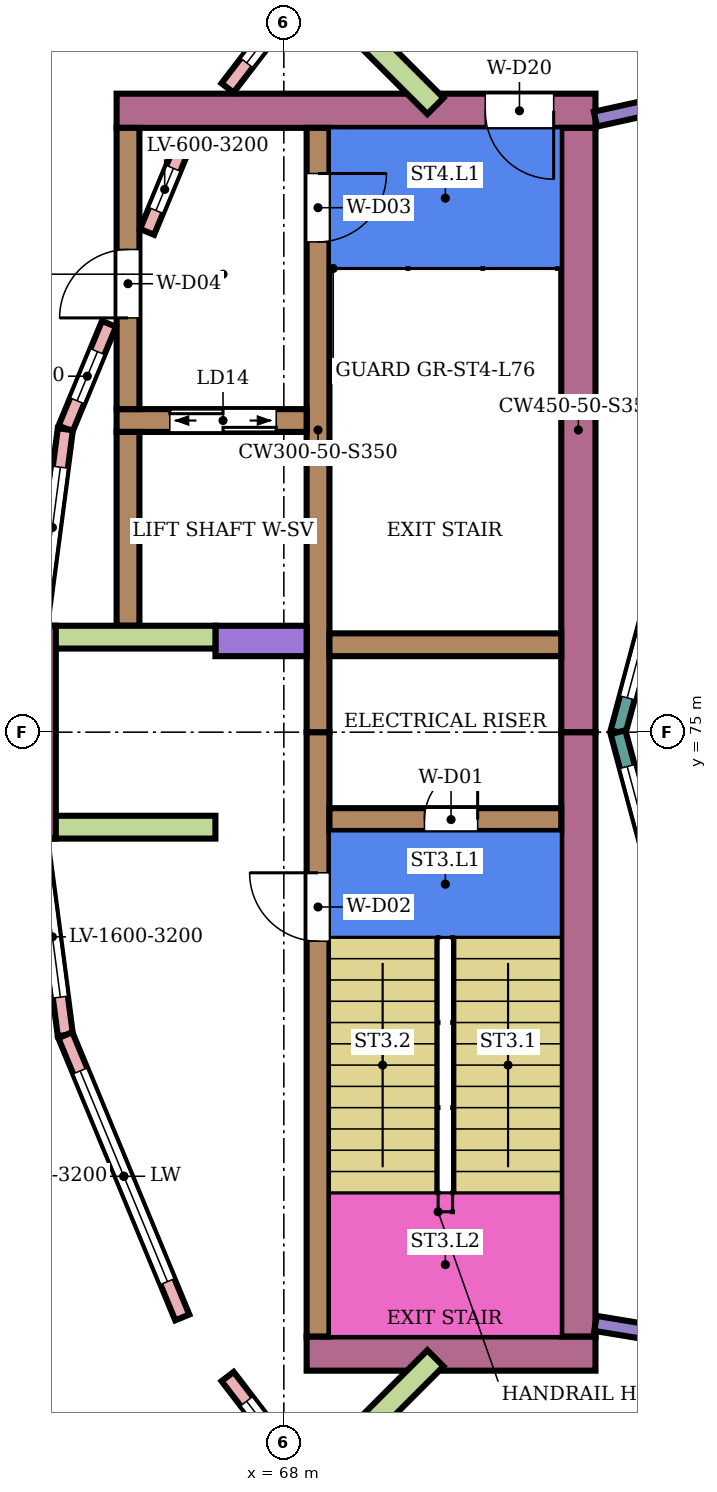
"""IFC4 building model, lengths in metres.
Left out: names, types, materials, properties, quantities, classifications, styles, units other than length and angle.
Written with IfcOpenShell. Run it as: python <this file> out.ifc"""

import sys

from ifc_helpers import new_model, si_unit, direction, frame, frame_2d, origin, place, context, subcontext, project, spatial, rectangle, extrude, element, fill, save


model = new_model("IFC4")
c1 = context("Model", 3, precision=1e-05, world=origin(), true_north=direction((0.0, 1.0)))
c2 = subcontext(c1, "Body", "Model", "MODEL_VIEW")
j1 = project(units=[si_unit("LENGTHUNIT", "METRE"), si_unit("PLANEANGLEUNIT", "RADIAN")], contexts=[c1])
p1 = place(None, origin())
s1 = spatial("IfcSite", under=j1, at=p1, CompositionType="ELEMENT")
p2 = place(p1, origin())
s2 = spatial("IfcBuilding", under=s1, at=p2, CompositionType="ELEMENT")
p3 = place(p2, frame((0.0, 0.0, 333.1)))
s3 = spatial("IfcBuildingStorey", under=s2, at=p3, CompositionType="ELEMENT", Elevation=333.1)
p4 = place(p3, frame((72.1, 66.825, 0.0), z_axis=(0.0, 0.0, 1.0), x_axis=(-1.0, 0.0, 0.0)))
e1 = element("IfcWall", 1, at=p4, inside=s3, PredefinedType="SHEAR", context=c2, shape_type="SweptSolid", body=[
    extrude(rectangle(XDim=3.8, YDim=0.45, at=frame_2d((1.9, 0.0))), origin(), (0.0, 0.0, 1.0), 4.15),
])
p5 = place(p3, frame((72.1, 83.175, 0.0), z_axis=(0.0, 0.0, 1.0), x_axis=(-1.0, 0.0, 0.0)))
e2 = element("IfcWall", 2, at=p5, inside=s3, PredefinedType="SHEAR", context=c2, shape_type="SweptSolid", body=[
    extrude(rectangle(XDim=6.3, YDim=0.45, at=frame_2d((3.15, 0.0))), origin(), (0.0, 0.0, 1.0), 4.15),
])
p6 = place(p5, frame((0.55, 0.0, 0.0)))
e3 = element("IfcOpeningElement", 3, at=p6, cuts=e2, PredefinedType="OPENING", context=c2, shape_type="SweptSolid", body=[
    extrude(rectangle(XDim=0.9, YDim=2.1, at=frame_2d((0.45, 1.05))), frame((0.0, 0.235, 0.0), z_axis=(0.0, -1.0, 0.0), x_axis=(1.0, 0.0, 0.0)), (0.0, 0.0, 1.0), 0.47),
])
for number, where, z_axis, x_axis in (
    (4, (71.875, 75.0, 0.0), (0.0, 0.0, 1.0), (0.0, -1.0, 0.0)),
    (5, (71.875, 82.95, 0.0), (0.0, 0.0, 1.0), (0.0, -1.0, 0.0)),
):
    element("IfcWall", number, at=place(p3, frame(where, z_axis=z_axis, x_axis=x_axis)), inside=s3, PredefinedType="SHEAR", context=c2, shape_type="SweptSolid", body=[
        extrude(rectangle(XDim=7.95, YDim=0.45, at=frame_2d((3.975, 0.0))), origin(), (0.0, 0.0, 1.0), 4.15),
    ])
p7 = place(p3, frame((68.45, 75.0, 0.0), z_axis=(0.0, 0.0, 1.0), x_axis=(0.0, -1.0, 0.0)))
e6 = element("IfcWall", 6, at=p7, inside=s3, PredefinedType="SHEAR", context=c2, shape_type="SweptSolid", body=[
    extrude(rectangle(XDim=7.95, YDim=0.3, at=frame_2d((3.975, 0.0))), origin(), (0.0, 0.0, 1.0), 4.15),
])
p8 = place(p7, frame((1.85, 0.0, 0.0)))
e7 = element("IfcOpeningElement", 7, at=p8, cuts=e6, PredefinedType="OPENING", context=c2, shape_type="SweptSolid", body=[
    extrude(rectangle(XDim=0.9, YDim=2.1, at=frame_2d((0.45, 1.05))), frame((0.0, 0.16, 0.0), z_axis=(0.0, -1.0, 0.0), x_axis=(1.0, 0.0, 0.0)), (0.0, 0.0, 1.0), 0.32),
])
p9 = place(p3, frame((68.45, 82.95, 0.0), z_axis=(0.0, 0.0, 1.0), x_axis=(0.0, -1.0, 0.0)))
e8 = element("IfcWall", 8, at=p9, inside=s3, PredefinedType="SHEAR", context=c2, shape_type="SweptSolid", body=[
    extrude(rectangle(XDim=7.95, YDim=0.3, at=frame_2d((3.975, 0.0))), origin(), (0.0, 0.0, 1.0), 4.15),
])
p10 = place(p9, frame((0.6, 0.0, 0.0)))
e9 = element("IfcOpeningElement", 9, at=p10, cuts=e8, PredefinedType="OPENING", context=c2, shape_type="SweptSolid", body=[
    extrude(rectangle(XDim=0.9, YDim=2.1, at=frame_2d((0.45, 1.05))), frame((0.0, 0.16, 0.0), z_axis=(0.0, -1.0, 0.0), x_axis=(1.0, 0.0, 0.0)), (0.0, 0.0, 1.0), 0.32),
])
p11 = place(p3, frame((71.65, 73.85, 0.0), z_axis=(0.0, 0.0, 1.0), x_axis=(-1.0, 0.0, 0.0)))
e10 = element("IfcWall", 10, at=p11, inside=s3, PredefinedType="SHEAR", context=c2, shape_type="SweptSolid", body=[
    extrude(rectangle(XDim=3.05, YDim=0.3, at=frame_2d((1.525, 0.0))), origin(), (0.0, 0.0, 1.0), 4.15),
])
p12 = place(p11, frame((1.1, 0.0, 0.0)))
e11 = element("IfcOpeningElement", 11, at=p12, cuts=e10, PredefinedType="OPENING", context=c2, shape_type="SweptSolid", body=[
    extrude(rectangle(XDim=0.7, YDim=2.0, at=frame_2d((0.35, 1.0))), frame((0.0, 0.16, 0.0), z_axis=(0.0, -1.0, 0.0), x_axis=(1.0, 0.0, 0.0)), (0.0, 0.0, 1.0), 0.32),
])
p13 = place(p3, frame((71.65, 76.15, 0.0), z_axis=(0.0, 0.0, 1.0), x_axis=(-1.0, 0.0, 0.0)))
e12 = element("IfcWall", 12, at=p13, inside=s3, PredefinedType="SHEAR", context=c2, shape_type="SweptSolid", body=[
    extrude(rectangle(XDim=3.05, YDim=0.3, at=frame_2d((1.525, 0.0))), origin(), (0.0, 0.0, 1.0), 4.15),
])
p14 = place(p3, frame((68.3, 79.1, 0.0), z_axis=(0.0, 0.0, 1.0), x_axis=(-1.0, 0.0, 0.0)))
e13 = element("IfcWall", 13, at=p14, inside=s3, PredefinedType="SHEAR", context=c2, shape_type="SweptSolid", body=[
    extrude(rectangle(XDim=2.5, YDim=0.3, at=frame_2d((1.25, 0.0))), origin(), (0.0, 0.0, 1.0), 4.15),
])
p15 = place(p14, frame((0.4, 0.0, 0.0)))
e14 = element("IfcOpeningElement", 14, at=p15, cuts=e13, PredefinedType="OPENING", context=c2, shape_type="SweptSolid", body=[
    extrude(rectangle(XDim=1.4, YDim=2.1, at=frame_2d((0.7, 1.05))), frame((0.0, 0.16, 0.0), z_axis=(0.0, -1.0, 0.0), x_axis=(1.0, 0.0, 0.0)), (0.0, 0.0, 1.0), 0.32),
])
p16 = place(p3, frame((68.3, 76.2, 0.0), z_axis=(0.0, 0.0, 1.0), x_axis=(-1.0, 0.0, 0.0)))
e15 = element("IfcWall", 15, at=p16, inside=s3, PredefinedType="SHEAR", context=c2, shape_type="SweptSolid", body=[
    extrude(rectangle(XDim=1.2, YDim=0.4, at=frame_2d((0.6, 0.0))), origin(), (0.0, 0.0, 1.0), 4.15),
])
p17 = place(p3, frame((65.95, 78.95, 0.0), z_axis=(0.0, 0.0, 1.0), x_axis=(0.0, -1.0, 0.0)))
e16 = element("IfcWall", 16, at=p17, inside=s3, PredefinedType="SHEAR", context=c2, shape_type="SweptSolid", body=[
    extrude(rectangle(XDim=2.55, YDim=0.3, at=frame_2d((1.275, 0.0))), origin(), (0.0, 0.0, 1.0), 4.15),
])
p18 = place(p3, frame((65.95, 82.95, 0.0), z_axis=(0.0, 0.0, 1.0), x_axis=(0.0, -1.0, 0.0)))
e17 = element("IfcWall", 17, at=p18, inside=s3, PredefinedType="SHEAR", context=c2, shape_type="SweptSolid", body=[
    extrude(rectangle(XDim=3.7, YDim=0.3, at=frame_2d((1.85, 0.0))), origin(), (0.0, 0.0, 1.0), 4.15),
])
p19 = place(p18, frame((1.6, 0.0, 0.0)))
e18 = element("IfcOpeningElement", 18, at=p19, cuts=e17, PredefinedType="OPENING", context=c2, shape_type="SweptSolid", body=[
    extrude(rectangle(XDim=0.9, YDim=2.1, at=frame_2d((0.45, 1.05))), frame((0.0, 0.16, 0.0), z_axis=(0.0, -1.0, 0.0), x_axis=(1.0, 0.0, 0.0)), (0.0, 0.0, 1.0), 0.32),
])
p20 = place(p3, frame((68.251, 84.769, 0.0), z_axis=(0.0, 0.0, 1.0), x_axis=(-0.608711363192, -0.793391754633, 0.0)))
e19 = element("IfcWall", 19, at=p20, inside=s3, PredefinedType="NOTDEFINED", context=c2, shape_type="SweptSolid", body=[
    extrude(rectangle(XDim=1.63, YDim=0.2, at=frame_2d((0.815, 0.0))), origin(), (0.0, 0.0, 1.0), 4.5),
])
p21 = place(p20, frame((0.415, 0.0, 0.5)))
e20 = element("IfcOpeningElement", 20, at=p21, cuts=e19, PredefinedType="OPENING", context=c2, shape_type="SweptSolid", body=[
    extrude(rectangle(XDim=0.8, YDim=3.2, at=frame_2d((0.4, 1.6))), frame((0.0, 0.11, 0.0), z_axis=(0.0, -1.0, 0.0), x_axis=(1.0, 0.0, 0.0)), (0.0, 0.0, 1.0), 0.22),
])
p22 = place(p3, frame((66.664, 82.699, 0.0), z_axis=(0.0, 0.0, 1.0), x_axis=(-0.382809221062, -0.923827419094, 0.0)))
e21 = element("IfcWall", 21, at=p22, inside=s3, PredefinedType="NOTDEFINED", context=c2, shape_type="SweptSolid", body=[
    extrude(rectangle(XDim=1.21, YDim=0.2, at=frame_2d((0.605, 0.0))), origin(), (0.0, 0.0, 1.0), 4.5),
])
p23 = place(p22, frame((0.305, 0.0, 0.5)))
e22 = element("IfcOpeningElement", 22, at=p23, cuts=e21, PredefinedType="OPENING", context=c2, shape_type="SweptSolid", body=[
    extrude(rectangle(XDim=0.6, YDim=3.2, at=frame_2d((0.3, 1.6))), frame((0.0, 0.11, 0.0), z_axis=(0.0, -1.0, 0.0), x_axis=(1.0, 0.0, 0.0)), (0.0, 0.0, 1.0), 0.22),
])
p24 = place(p3, frame((65.7, 80.371, 0.0), z_axis=(0.0, 0.0, 1.0), x_axis=(-0.38277629043, -0.923841063974, 0.0)))
e23 = element("IfcWall", 23, at=p24, inside=s3, PredefinedType="NOTDEFINED", context=c2, shape_type="SweptSolid", body=[
    extrude(rectangle(XDim=1.49, YDim=0.2, at=frame_2d((0.745, 0.0))), origin(), (0.0, 0.0, 1.0), 4.5),
])
p25 = place(p24, frame((0.395, 0.0, 0.5)))
e24 = element("IfcOpeningElement", 24, at=p25, cuts=e23, PredefinedType="OPENING", context=c2, shape_type="SweptSolid", body=[
    extrude(rectangle(XDim=0.7, YDim=3.2, at=frame_2d((0.35, 1.6))), frame((0.0, 0.11, 0.0), z_axis=(0.0, -1.0, 0.0), x_axis=(1.0, 0.0, 0.0)), (0.0, 0.0, 1.0), 0.22),
])
p26 = place(p3, frame((65.125, 78.986, 0.0), z_axis=(0.0, 0.0, 1.0), x_axis=(-0.130495678972, -0.991448878041, 0.0)))
e25 = element("IfcWall", 25, at=p26, inside=s3, PredefinedType="NOTDEFINED", context=c2, shape_type="SweptSolid", body=[
    extrude(rectangle(XDim=2.608, YDim=0.2, at=frame_2d((1.304, 0.0))), origin(), (0.0, 0.0, 1.0), 4.5),
])
p27 = place(p26, frame((0.504, 0.0, 0.5)))
e26 = element("IfcOpeningElement", 26, at=p27, cuts=e25, PredefinedType="OPENING", context=c2, shape_type="SweptSolid", body=[
    extrude(rectangle(XDim=1.6, YDim=3.2, at=frame_2d((0.8, 1.6))), frame((0.0, 0.11, 0.0), z_axis=(0.0, -1.0, 0.0), x_axis=(1.0, 0.0, 0.0)), (0.0, 0.0, 1.0), 0.22),
])
p28 = place(p3, frame((64.785, 73.6, 0.0), z_axis=(0.0, 0.0, 1.0), x_axis=(0.130495678972, -0.991448878041, 0.0)))
e27 = element("IfcWall", 27, at=p28, inside=s3, PredefinedType="NOTDEFINED", context=c2, shape_type="SweptSolid", body=[
    extrude(rectangle(XDim=2.608, YDim=0.2, at=frame_2d((1.304, 0.0))), origin(), (0.0, 0.0, 1.0), 4.5),
])
p29 = place(p28, frame((0.504, 0.0, 0.5)))
e28 = element("IfcOpeningElement", 28, at=p29, cuts=e27, PredefinedType="OPENING", context=c2, shape_type="SweptSolid", body=[
    extrude(rectangle(XDim=1.6, YDim=3.2, at=frame_2d((0.8, 1.6))), frame((0.0, 0.11, 0.0), z_axis=(0.0, -1.0, 0.0), x_axis=(1.0, 0.0, 0.0)), (0.0, 0.0, 1.0), 0.22),
])
p30 = place(p3, frame((65.125, 71.014, 0.0), z_axis=(0.0, 0.0, 1.0), x_axis=(0.38273440371, -0.923858417842, 0.0)))
e29 = element("IfcWall", 29, at=p30, inside=s3, PredefinedType="NOTDEFINED", context=c2, shape_type="SweptSolid", body=[
    extrude(rectangle(XDim=4.02, YDim=0.2, at=frame_2d((2.01, 0.0))), origin(), (0.0, 0.0, 1.0), 4.5),
])
p31 = place(p30, frame((0.51, 0.0, 0.5)))
e30 = element("IfcOpeningElement", 30, at=p31, cuts=e29, PredefinedType="OPENING", context=c2, shape_type="SweptSolid", body=[
    extrude(rectangle(XDim=3.0, YDim=3.2, at=frame_2d((1.5, 1.6))), frame((0.0, 0.11, 0.0), z_axis=(0.0, -1.0, 0.0), x_axis=(1.0, 0.0, 0.0)), (0.0, 0.0, 1.0), 0.22),
])
p32 = place(p3, frame((67.26, 66.523, 0.0), z_axis=(0.0, 0.0, 1.0), x_axis=(0.608836430161, -0.79329578425, 0.0)))
e31 = element("IfcWall", 31, at=p32, inside=s3, PredefinedType="NOTDEFINED", context=c2, shape_type="SweptSolid", body=[
    extrude(rectangle(XDim=1.62, YDim=0.2, at=frame_2d((0.81, 0.0))), origin(), (0.0, 0.0, 1.0), 4.5),
])
p33 = place(p32, frame((0.41, 0.0, 0.5)))
e32 = element("IfcOpeningElement", 32, at=p33, cuts=e31, PredefinedType="OPENING", context=c2, shape_type="SweptSolid", body=[
    extrude(rectangle(XDim=0.8, YDim=3.2, at=frame_2d((0.4, 1.6))), frame((0.0, 0.11, 0.0), z_axis=(0.0, -1.0, 0.0), x_axis=(1.0, 0.0, 0.0)), (0.0, 0.0, 1.0), 0.22),
])
for number, where, z_axis, x_axis in (
    (33, (69.994, 83.238, 0.0), (0.0, 0.0, 1.0), (-0.707, 0.707, 0.0)),
    (34, (67.1, 76.25, 0.0), (0.0, 0.0, 1.0), (-1.0, 0.0, 0.0)),
    (35, (67.1, 73.75, 0.0), (0.0, 0.0, 1.0), (-1.0, 0.0, 0.0)),
    (36, (69.994, 66.762, 0.0), (0.0, 0.0, 1.0), (-0.707, -0.707, 0.0)),
):
    element("IfcWall", number, at=place(p3, frame(where, z_axis=z_axis, x_axis=x_axis)), inside=s3, PredefinedType="NOTDEFINED", context=c2, shape_type="SweptSolid", body=[
        extrude(rectangle(XDim=2.416, YDim=0.3, at=frame_2d((1.208, 0.0))), origin(), (0.0, 0.0, 1.0), 4.5),
    ])
p34 = place(p3, frame((73.415, 78.802, 0.0), z_axis=(0.0, 0.0, 1.0), x_axis=(-0.258789828301, -0.965933654434, 0.0)))
e37 = element("IfcWall", 37, at=p34, inside=s3, PredefinedType="NOTDEFINED", context=c2, shape_type="SweptSolid", body=[
    extrude(rectangle(XDim=3.936, YDim=0.2, at=frame_2d((1.968, 0.0))), origin(), (0.0, 0.0, 1.0), 4.5),
])
p35 = place(p34, frame((0.468, 0.0, 0.9)))
e38 = element("IfcOpeningElement", 38, at=p35, cuts=e37, PredefinedType="OPENING", context=c2, shape_type="SweptSolid", body=[
    extrude(rectangle(XDim=3.0, YDim=2.3, at=frame_2d((1.5, 1.15))), frame((0.0, 0.11, 0.0), z_axis=(0.0, -1.0, 0.0), x_axis=(1.0, 0.0, 0.0)), (0.0, 0.0, 1.0), 0.22),
])
p36 = place(p3, frame((72.396, 75.0, 0.0), z_axis=(0.0, 0.0, 1.0), x_axis=(0.258789828301, -0.965933654434, 0.0)))
e39 = element("IfcWall", 39, at=p36, inside=s3, PredefinedType="NOTDEFINED", context=c2, shape_type="SweptSolid", body=[
    extrude(rectangle(XDim=3.936, YDim=0.2, at=frame_2d((1.968, 0.0))), origin(), (0.0, 0.0, 1.0), 4.5),
])
p37 = place(p36, frame((0.468, 0.0, 0.9)))
e40 = element("IfcOpeningElement", 40, at=p37, cuts=e39, PredefinedType="OPENING", context=c2, shape_type="SweptSolid", body=[
    extrude(rectangle(XDim=3.0, YDim=2.3, at=frame_2d((1.5, 1.15))), frame((0.0, 0.11, 0.0), z_axis=(0.0, -1.0, 0.0), x_axis=(1.0, 0.0, 0.0)), (0.0, 0.0, 1.0), 0.22),
])
p38 = place(p3, frame((66.496, 63.777, 0.0), z_axis=(0.0, 0.0, 1.0), x_axis=(-0.608760025056, 0.79335441758, 0.0)))
e41 = element("IfcWall", 41, at=p38, inside=s3, PredefinedType="PARAPET", context=c2, shape_type="SweptSolid", body=[
    extrude(rectangle(XDim=2.98, YDim=0.2, at=frame_2d((1.49, 0.0))), origin(), (0.0, 0.0, 1.0), 1.1),
])
p39 = place(p3, frame((64.9, 73.6, 0.0), z_axis=(0.0, 0.0, 1.0), x_axis=(0.0, 1.0, 0.0)))
e42 = element("IfcWall", 42, at=p39, inside=s3, PredefinedType="PARAPET", context=c2, shape_type="SweptSolid", body=[
    extrude(rectangle(XDim=2.8, YDim=0.2, at=frame_2d((1.4, 0.0))), origin(), (0.0, 0.0, 1.0), 1.1),
])
p40 = place(p3, frame((64.682, 83.859, 0.0), z_axis=(0.0, 0.0, 1.0), x_axis=(0.608760025056, 0.79335441758, 0.0)))
e43 = element("IfcWall", 43, at=p40, inside=s3, PredefinedType="PARAPET", context=c2, shape_type="SweptSolid", body=[
    extrude(rectangle(XDim=2.98, YDim=0.2, at=frame_2d((1.49, 0.0))), origin(), (0.0, 0.0, 1.0), 1.1),
])
p41 = place(p3, frame((72.1, 67.222, 0.0), z_axis=(0.0, 0.0, 1.0), x_axis=(0.986662669858, -0.162778302943, 0.0)))
e44 = element("IfcWall", 44, at=p41, inside=s3, PredefinedType="PARTITIONING", context=c2, shape_type="SweptSolid", body=[
    extrude(rectangle(XDim=2.785, YDim=0.2, at=frame_2d((1.393, 0.0))), origin(), (0.0, 0.0, 1.0), 4.05),
])
p42 = place(p41, frame((0.798, 0.0, 0.0)))
e45 = element("IfcOpeningElement", 45, at=p42, cuts=e44, PredefinedType="OPENING", context=c2, shape_type="SweptSolid", body=[
    extrude(rectangle(XDim=1.2, YDim=2.4, at=frame_2d((0.6, 1.2))), frame((0.0, 0.11, 0.0), z_axis=(0.0, -1.0, 0.0), x_axis=(1.0, 0.0, 0.0)), (0.0, 0.0, 1.0), 0.22),
])
p43 = place(p3, frame((72.1, 83.065, 0.0), z_axis=(0.0, 0.0, 1.0), x_axis=(0.976423939717, 0.215861738037, 0.0)))
e46 = element("IfcWall", 46, at=p43, inside=s3, PredefinedType="PARTITIONING", context=c2, shape_type="SweptSolid", body=[
    extrude(rectangle(XDim=2.613, YDim=0.2, at=frame_2d((1.306, 0.0))), origin(), (0.0, 0.0, 1.0), 4.05),
])
p44 = place(p43, frame((0.711, 0.0, 0.0)))
e47 = element("IfcOpeningElement", 47, at=p44, cuts=e46, PredefinedType="OPENING", context=c2, shape_type="SweptSolid", body=[
    extrude(rectangle(XDim=1.2, YDim=2.4, at=frame_2d((0.6, 1.2))), frame((0.0, 0.11, 0.0), z_axis=(0.0, -1.0, 0.0), x_axis=(1.0, 0.0, 0.0)), (0.0, 0.0, 1.0), 0.22),
])
p45 = place(p21, origin())
e48 = element("IfcWindow", 48, at=p45, inside=s3, PartitioningType="SINGLE_PANEL", PredefinedType="USERDEFINED", context=c2, shape_type="SweptSolid", body=[
    extrude(rectangle(XDim=0.8, YDim=3.2, at=frame_2d((0.4, 1.6))), frame((0.0, 0.03, 0.0), z_axis=(0.0, -1.0, 0.0), x_axis=(1.0, 0.0, 0.0)), (0.0, 0.0, 1.0), 0.06),
])
fill(e20, e48)
p46 = place(p23, origin())
e49 = element("IfcWindow", 49, at=p46, inside=s3, PartitioningType="SINGLE_PANEL", PredefinedType="USERDEFINED", context=c2, shape_type="SweptSolid", body=[
    extrude(rectangle(XDim=0.6, YDim=3.2, at=frame_2d((0.3, 1.6))), frame((0.0, 0.03, 0.0), z_axis=(0.0, -1.0, 0.0), x_axis=(1.0, 0.0, 0.0)), (0.0, 0.0, 1.0), 0.06),
])
fill(e22, e49)
p47 = place(p25, origin())
e50 = element("IfcWindow", 50, at=p47, inside=s3, PartitioningType="SINGLE_PANEL", PredefinedType="USERDEFINED", context=c2, shape_type="SweptSolid", body=[
    extrude(rectangle(XDim=0.7, YDim=3.2, at=frame_2d((0.35, 1.6))), frame((0.0, 0.03, 0.0), z_axis=(0.0, -1.0, 0.0), x_axis=(1.0, 0.0, 0.0)), (0.0, 0.0, 1.0), 0.06),
])
fill(e24, e50)
p48 = place(p27, origin())
e51 = element("IfcWindow", 51, at=p48, inside=s3, PartitioningType="SINGLE_PANEL", PredefinedType="USERDEFINED", context=c2, shape_type="SweptSolid", body=[
    extrude(rectangle(XDim=1.6, YDim=3.2, at=frame_2d((0.8, 1.6))), frame((0.0, 0.03, 0.0), z_axis=(0.0, -1.0, 0.0), x_axis=(1.0, 0.0, 0.0)), (0.0, 0.0, 1.0), 0.06),
])
fill(e26, e51)
p49 = place(p29, origin())
e52 = element("IfcWindow", 52, at=p49, inside=s3, PartitioningType="SINGLE_PANEL", PredefinedType="USERDEFINED", context=c2, shape_type="SweptSolid", body=[
    extrude(rectangle(XDim=1.6, YDim=3.2, at=frame_2d((0.8, 1.6))), frame((0.0, 0.03, 0.0), z_axis=(0.0, -1.0, 0.0), x_axis=(1.0, 0.0, 0.0)), (0.0, 0.0, 1.0), 0.06),
])
fill(e28, e52)
p50 = place(p31, origin())
e53 = element("IfcWindow", 53, at=p50, inside=s3, PartitioningType="SINGLE_PANEL", PredefinedType="USERDEFINED", context=c2, shape_type="SweptSolid", body=[
    extrude(rectangle(XDim=3.0, YDim=3.2, at=frame_2d((1.5, 1.6))), frame((0.0, 0.03, 0.0), z_axis=(0.0, -1.0, 0.0), x_axis=(1.0, 0.0, 0.0)), (0.0, 0.0, 1.0), 0.06),
])
fill(e30, e53)
p51 = place(p33, origin())
e54 = element("IfcWindow", 54, at=p51, inside=s3, PartitioningType="SINGLE_PANEL", PredefinedType="USERDEFINED", context=c2, shape_type="SweptSolid", body=[
    extrude(rectangle(XDim=0.8, YDim=3.2, at=frame_2d((0.4, 1.6))), frame((0.0, 0.03, 0.0), z_axis=(0.0, -1.0, 0.0), x_axis=(1.0, 0.0, 0.0)), (0.0, 0.0, 1.0), 0.06),
])
fill(e32, e54)
p52 = place(p35, origin())
e55 = element("IfcWindow", 55, at=p52, inside=s3, PartitioningType="SINGLE_PANEL", PredefinedType="WINDOW", context=c2, shape_type="SweptSolid", body=[
    extrude(rectangle(XDim=3.0, YDim=2.3, at=frame_2d((1.5, 1.15))), frame((0.0, 0.03, 0.0), z_axis=(0.0, -1.0, 0.0), x_axis=(1.0, 0.0, 0.0)), (0.0, 0.0, 1.0), 0.06),
])
fill(e38, e55)
p53 = place(p37, origin())
e56 = element("IfcWindow", 56, at=p53, inside=s3, PartitioningType="SINGLE_PANEL", PredefinedType="WINDOW", context=c2, shape_type="SweptSolid", body=[
    extrude(rectangle(XDim=3.0, YDim=2.3, at=frame_2d((1.5, 1.15))), frame((0.0, 0.03, 0.0), z_axis=(0.0, -1.0, 0.0), x_axis=(1.0, 0.0, 0.0)), (0.0, 0.0, 1.0), 0.06),
])
fill(e40, e56)
p54 = place(p12, frame((0.7, 0.0, 0.0), z_axis=(0.0, 0.0, 1.0), x_axis=(-1.0, 0.0, 0.0)))
e57 = element("IfcDoor", 57, at=p54, inside=s3, OperationType="SINGLE_SWING_RIGHT", PredefinedType="DOOR", context=c2, shape_type="SweptSolid", body=[
    extrude(rectangle(XDim=0.7, YDim=2.0, at=frame_2d((0.35, 1.0))), frame((0.0, 0.025, 0.0), z_axis=(0.0, -1.0, 0.0), x_axis=(1.0, 0.0, 0.0)), (0.0, 0.0, 1.0), 0.05),
])
fill(e11, e57)
p55 = place(p8, frame((0.9, 0.0, 0.0), z_axis=(0.0, 0.0, 1.0), x_axis=(-1.0, 0.0, 0.0)))
e58 = element("IfcDoor", 58, at=p55, inside=s3, OperationType="SINGLE_SWING_RIGHT", PredefinedType="DOOR", context=c2, shape_type="SweptSolid", body=[
    extrude(rectangle(XDim=0.9, YDim=2.1, at=frame_2d((0.45, 1.05))), frame((0.0, 0.025, 0.0), z_axis=(0.0, -1.0, 0.0), x_axis=(1.0, 0.0, 0.0)), (0.0, 0.0, 1.0), 0.05),
])
fill(e7, e58)
p56 = place(p10, origin())
e59 = element("IfcDoor", 59, at=p56, inside=s3, OperationType="SINGLE_SWING_LEFT", PredefinedType="DOOR", context=c2, shape_type="SweptSolid", body=[
    extrude(rectangle(XDim=0.9, YDim=2.1, at=frame_2d((0.45, 1.05))), frame((0.0, 0.025, 0.0), z_axis=(0.0, -1.0, 0.0), x_axis=(1.0, 0.0, 0.0)), (0.0, 0.0, 1.0), 0.05),
])
fill(e9, e59)
p57 = place(p15, origin())
e60 = element("IfcDoor", 60, at=p57, inside=s3, OperationType="DOUBLE_DOOR_SLIDING", PredefinedType="DOOR", context=c2, shape_type="SweptSolid", body=[
    extrude(rectangle(XDim=1.4, YDim=2.1, at=frame_2d((0.7, 1.05))), frame((0.0, 0.025, 0.0), z_axis=(0.0, -1.0, 0.0), x_axis=(1.0, 0.0, 0.0)), (0.0, 0.0, 1.0), 0.05),
])
fill(e14, e60)
p58 = place(p19, frame((0.9, 0.0, 0.0), z_axis=(0.0, 0.0, 1.0), x_axis=(-1.0, 0.0, 0.0)))
e61 = element("IfcDoor", 61, at=p58, inside=s3, OperationType="SINGLE_SWING_LEFT", PredefinedType="DOOR", context=c2, shape_type="SweptSolid", body=[
    extrude(rectangle(XDim=0.9, YDim=2.1, at=frame_2d((0.45, 1.05))), frame((0.0, 0.025, 0.0), z_axis=(0.0, -1.0, 0.0), x_axis=(1.0, 0.0, 0.0)), (0.0, 0.0, 1.0), 0.05),
])
fill(e18, e61)
p59 = place(p6, origin())
e62 = element("IfcDoor", 62, at=p59, inside=s3, OperationType="SINGLE_SWING_LEFT", PredefinedType="DOOR", context=c2, shape_type="SweptSolid", body=[
    extrude(rectangle(XDim=0.9, YDim=2.1, at=frame_2d((0.45, 1.05))), frame((0.0, 0.025, 0.0), z_axis=(0.0, -1.0, 0.0), x_axis=(1.0, 0.0, 0.0)), (0.0, 0.0, 1.0), 0.05),
])
fill(e3, e62)
save(model, sys.argv[1])
